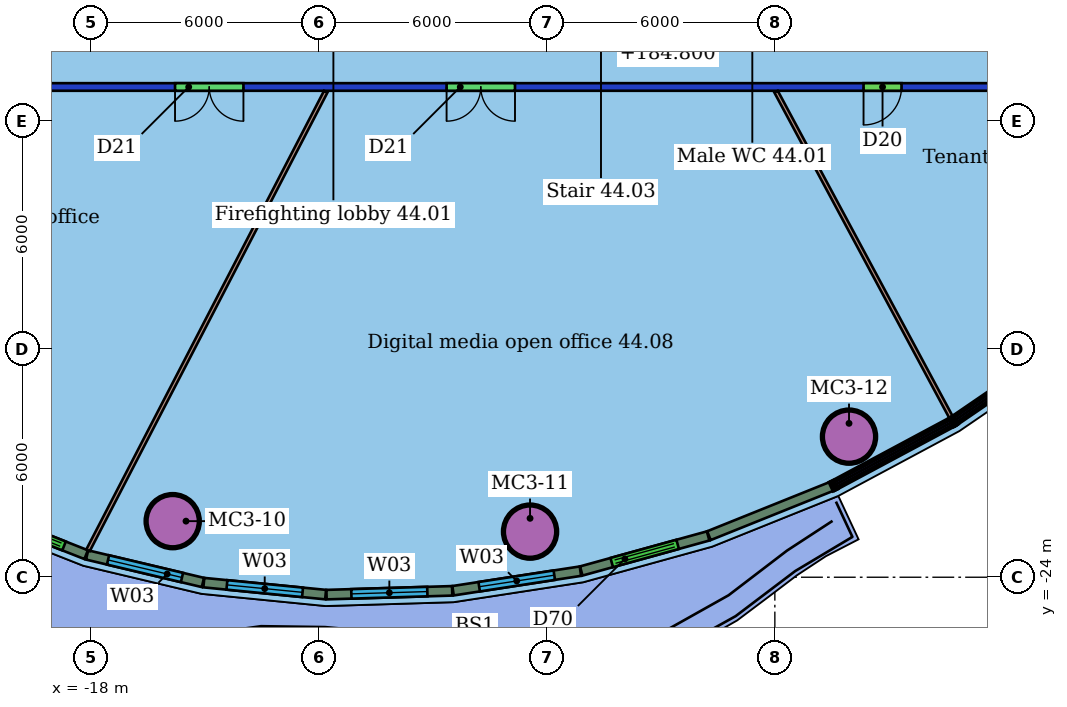
"""IFC4 building model, lengths in metres.
Left out: names, types, materials, properties, quantities, classifications, styles, units other than length and angle.
Written with IfcOpenShell. Run it as: python <this file> out.ifc"""

import sys

from ifc_helpers import new_model, si_unit, direction, frame, frame_2d, origin, origin_2d, place, context, subcontext, project, spatial, rectangle, hollow_circle, extrude, element, fill, save


model = new_model("IFC4")
c1 = context("Model", 3, precision=1e-05, world=origin(), true_north=direction((0.0, 1.0)))
c2 = subcontext(c1, "Body", "Model", "MODEL_VIEW")
j1 = project(units=[si_unit("LENGTHUNIT", "METRE"), si_unit("PLANEANGLEUNIT", "RADIAN")], contexts=[c1])
p1 = place(None, origin())
s1 = spatial("IfcSite", under=j1, at=p1, CompositionType="ELEMENT")
p2 = place(p1, origin())
s2 = spatial("IfcBuilding", under=s1, at=p2, CompositionType="ELEMENT")
p3 = place(p2, frame((0.0, 0.0, 183.0)))
s3 = spatial("IfcBuildingStorey", under=s2, at=p3, CompositionType="ELEMENT", Elevation=183.0)
for number, where, z_axis, x_axis in (
    (1, (-15.845, -22.524, 0.0), (0.0, 0.0, 1.0), (1.0, 0.0, 0.0)),
    (2, (-6.442, -22.8, 0.0), (0.0, 0.0, 1.0), (1.0, 0.0, 0.0)),
    (3, (1.952, -20.301, 0.0), (0.0, 0.0, 1.0), (1.0, 0.0, 0.0)),
):
    element("IfcColumn", number, at=place(p3, frame(where, z_axis=z_axis, x_axis=x_axis)), inside=s3, PredefinedType="COLUMN", context=c2, shape_type="SweptSolid", body=[
        extrude(hollow_circle(Radius=0.7, WallThickness=0.05, at=origin_2d()), origin(), (0.0, 0.0, 1.0), 3.45),
    ])
p4 = place(p3, frame((8.2, -11.1, 0.0), z_axis=(0.0, 0.0, 1.0), x_axis=(-1.0, 0.0, 0.0)))
e4 = element("IfcWall", 4, at=p4, inside=s3, PredefinedType="PARTITIONING", context=c2, shape_type="SweptSolid", body=[
    extrude(rectangle(XDim=28.4, YDim=0.2, at=frame_2d((14.2, 0.0))), origin(), (0.0, 0.0, 1.0), 3.05),
])
p5 = place(p4, frame((22.184, 0.0, 0.0)))
e5 = element("IfcOpeningElement", 5, at=p5, cuts=e4, PredefinedType="OPENING", context=c2, shape_type="SweptSolid", body=[
    extrude(rectangle(XDim=1.8, YDim=2.1, at=frame_2d((0.9, 1.05))), frame((0.0, 0.11, 0.0), z_axis=(0.0, -1.0, 0.0), x_axis=(1.0, 0.0, 0.0)), (0.0, 0.0, 1.0), 0.22),
])
p6 = place(p4, frame((15.038, 0.0, 0.0)))
e6 = element("IfcOpeningElement", 6, at=p6, cuts=e4, PredefinedType="OPENING", context=c2, shape_type="SweptSolid", body=[
    extrude(rectangle(XDim=1.8, YDim=2.1, at=frame_2d((0.9, 1.05))), frame((0.0, 0.11, 0.0), z_axis=(0.0, -1.0, 0.0), x_axis=(1.0, 0.0, 0.0)), (0.0, 0.0, 1.0), 0.22),
])
p7 = place(p4, frame((4.866, 0.0, 0.0)))
e7 = element("IfcOpeningElement", 7, at=p7, cuts=e4, PredefinedType="OPENING", context=c2, shape_type="SweptSolid", body=[
    extrude(rectangle(XDim=1.0, YDim=2.1, at=frame_2d((0.5, 1.05))), frame((0.0, 0.11, 0.0), z_axis=(0.0, -1.0, 0.0), x_axis=(1.0, 0.0, 0.0)), (0.0, 0.0, 1.0), 0.22),
])
p8 = place(p3, frame((-18.073, -23.292, 0.0), z_axis=(0.0, 0.0, 1.0), x_axis=(0.460190817997, 0.88782003302, 0.0)))
e8 = element("IfcWall", 8, at=p8, inside=s3, PredefinedType="PARTITIONING", context=c2, shape_type="SweptSolid", body=[
    extrude(rectangle(XDim=13.594, YDim=0.1, at=frame_2d((6.797, 0.0))), origin(), (0.0, 0.0, 1.0), 3.45),
])
p9 = place(p3, frame((4.636, -19.79, 0.0), z_axis=(0.0, 0.0, 1.0), x_axis=(-0.473408054694, 0.880843240169, 0.0)))
e9 = element("IfcWall", 9, at=p9, inside=s3, PredefinedType="PARTITIONING", context=c2, shape_type="SweptSolid", body=[
    extrude(rectangle(XDim=9.725, YDim=0.1, at=frame_2d((4.863, 0.0))), origin(), (0.0, 0.0, 1.0), 3.45),
])
p10 = place(p3, frame((-20.961, -22.287, 0.0), z_axis=(0.0, 0.0, 1.0), x_axis=(0.930291773294, -0.366820414564, 0.0)))
e10 = element("IfcWall", 10, at=p10, inside=s3, PredefinedType="SOLIDWALL", context=c2, shape_type="SweptSolid", body=[
    extrude(rectangle(XDim=3.052, YDim=0.25, at=frame_2d((1.526, 0.0))), origin(), (0.0, 0.0, 1.0), 3.1),
])
p11 = place(p10, frame((0.626, 0.0, 0.0)))
e11 = element("IfcOpeningElement", 11, at=p11, cuts=e10, PredefinedType="OPENING", context=c2, shape_type="SweptSolid", body=[
    extrude(rectangle(XDim=1.8, YDim=2.4, at=frame_2d((0.9, 1.2))), frame((0.0, 0.135, 0.0), z_axis=(0.0, -1.0, 0.0), x_axis=(1.0, 0.0, 0.0)), (0.0, 0.0, 1.0), 0.27),
])
p12 = place(p3, frame((-18.098, -23.414, 0.0), z_axis=(0.0, 0.0, 1.0), x_axis=(0.972913986276, -0.231167418353, 0.0)))
e12 = element("IfcWall", 12, at=p12, inside=s3, PredefinedType="SOLIDWALL", context=c2, shape_type="SweptSolid", body=[
    extrude(rectangle(XDim=3.133, YDim=0.25, at=frame_2d((1.566, 0.0))), origin(), (0.0, 0.0, 1.0), 3.1),
])
p13 = place(p12, frame((0.566, 0.0, 0.9)))
e13 = element("IfcOpeningElement", 13, at=p13, cuts=e12, PredefinedType="OPENING", context=c2, shape_type="SweptSolid", body=[
    extrude(rectangle(XDim=2.0, YDim=2.1, at=frame_2d((1.0, 1.05))), frame((0.0, 0.135, 0.0), z_axis=(0.0, -1.0, 0.0), x_axis=(1.0, 0.0, 0.0)), (0.0, 0.0, 1.0), 0.27),
])
p14 = place(p3, frame((-15.026, -24.142, 0.0), z_axis=(0.0, 0.0, 1.0), x_axis=(0.995197289781, -0.097889501037, 0.0)))
e14 = element("IfcWall", 14, at=p14, inside=s3, PredefinedType="SOLIDWALL", context=c2, shape_type="SweptSolid", body=[
    extrude(rectangle(XDim=3.22, YDim=0.25, at=frame_2d((1.61, 0.0))), origin(), (0.0, 0.0, 1.0), 3.1),
])
p15 = place(p14, frame((0.61, 0.0, 0.9)))
e15 = element("IfcOpeningElement", 15, at=p15, cuts=e14, PredefinedType="OPENING", context=c2, shape_type="SweptSolid", body=[
    extrude(rectangle(XDim=2.0, YDim=2.1, at=frame_2d((1.0, 1.05))), frame((0.0, 0.135, 0.0), z_axis=(0.0, -1.0, 0.0), x_axis=(1.0, 0.0, 0.0)), (0.0, 0.0, 1.0), 0.27),
])
p16 = place(p3, frame((-11.797, -24.458, 0.0), z_axis=(0.0, 0.0, 1.0), x_axis=(0.999539823928, 0.030333815819, 0.0)))
e16 = element("IfcWall", 16, at=p16, inside=s3, PredefinedType="SOLIDWALL", context=c2, shape_type="SweptSolid", body=[
    extrude(rectangle(XDim=3.308, YDim=0.25, at=frame_2d((1.654, 0.0))), origin(), (0.0, 0.0, 1.0), 3.1),
])
p17 = place(p16, frame((0.654, 0.0, 0.9)))
e17 = element("IfcOpeningElement", 17, at=p17, cuts=e16, PredefinedType="OPENING", context=c2, shape_type="SweptSolid", body=[
    extrude(rectangle(XDim=2.0, YDim=2.1, at=frame_2d((1.0, 1.05))), frame((0.0, 0.135, 0.0), z_axis=(0.0, -1.0, 0.0), x_axis=(1.0, 0.0, 0.0)), (0.0, 0.0, 1.0), 0.27),
])
p18 = place(p3, frame((-8.468, -24.355, 0.0), z_axis=(0.0, 0.0, 1.0), x_axis=(0.988391666962, 0.151927326968, 0.0)))
e18 = element("IfcWall", 18, at=p18, inside=s3, PredefinedType="SOLIDWALL", context=c2, shape_type="SweptSolid", body=[
    extrude(rectangle(XDim=3.391, YDim=0.25, at=frame_2d((1.695, 0.0))), origin(), (0.0, 0.0, 1.0), 3.1),
])
p19 = place(p18, frame((0.695, 0.0, 0.9)))
e19 = element("IfcOpeningElement", 19, at=p19, cuts=e18, PredefinedType="OPENING", context=c2, shape_type="SweptSolid", body=[
    extrude(rectangle(XDim=2.0, YDim=2.1, at=frame_2d((1.0, 1.05))), frame((0.0, 0.135, 0.0), z_axis=(0.0, -1.0, 0.0), x_axis=(1.0, 0.0, 0.0)), (0.0, 0.0, 1.0), 0.27),
])
p20 = place(p3, frame((-5.094, -23.836, 0.0), z_axis=(0.0, 0.0, 1.0), x_axis=(0.963922792933, 0.266181985236, 0.0)))
e20 = element("IfcWall", 20, at=p20, inside=s3, PredefinedType="SOLIDWALL", context=c2, shape_type="SweptSolid", body=[
    extrude(rectangle(XDim=3.463, YDim=0.25, at=frame_2d((1.732, 0.0))), origin(), (0.0, 0.0, 1.0), 3.1),
])
p21 = place(p20, frame((0.832, 0.0, 0.0)))
e21 = element("IfcOpeningElement", 21, at=p21, cuts=e20, PredefinedType="OPENING", context=c2, shape_type="SweptSolid", body=[
    extrude(rectangle(XDim=1.8, YDim=2.4, at=frame_2d((0.9, 1.2))), frame((0.0, 0.135, 0.0), z_axis=(0.0, -1.0, 0.0), x_axis=(1.0, 0.0, 0.0)), (0.0, 0.0, 1.0), 0.27),
])
p22 = place(p3, frame((-1.735, -22.907, 0.0), z_axis=(0.0, 0.0, 1.0), x_axis=(0.92785563981, 0.372939554984, 0.0)))
e22 = element("IfcWall", 22, at=p22, inside=s3, PredefinedType="SOLIDWALL", context=c2, shape_type="SweptSolid", body=[
    extrude(rectangle(XDim=3.478, YDim=0.25, at=frame_2d((1.739, 0.0))), origin(), (0.0, 0.0, 1.0), 3.1),
])
p23 = place(p5, origin())
e23 = element("IfcDoor", 23, at=p23, inside=s3, OperationType="DOUBLE_DOOR_SINGLE_SWING", PredefinedType="DOOR", context=c2, shape_type="SweptSolid", body=[
    extrude(rectangle(XDim=1.8, YDim=2.1, at=frame_2d((0.9, 1.05))), frame((0.0, 0.025, 0.0), z_axis=(0.0, -1.0, 0.0), x_axis=(1.0, 0.0, 0.0)), (0.0, 0.0, 1.0), 0.05),
])
fill(e5, e23)
p24 = place(p6, origin())
e24 = element("IfcDoor", 24, at=p24, inside=s3, OperationType="DOUBLE_DOOR_SINGLE_SWING", PredefinedType="DOOR", context=c2, shape_type="SweptSolid", body=[
    extrude(rectangle(XDim=1.8, YDim=2.1, at=frame_2d((0.9, 1.05))), frame((0.0, 0.025, 0.0), z_axis=(0.0, -1.0, 0.0), x_axis=(1.0, 0.0, 0.0)), (0.0, 0.0, 1.0), 0.05),
])
fill(e6, e24)
p25 = place(p7, origin())
e25 = element("IfcDoor", 25, at=p25, inside=s3, OperationType="SINGLE_SWING_RIGHT", PredefinedType="DOOR", context=c2, shape_type="SweptSolid", body=[
    extrude(rectangle(XDim=1.0, YDim=2.1, at=frame_2d((0.5, 1.05))), frame((0.0, 0.025, 0.0), z_axis=(0.0, -1.0, 0.0), x_axis=(1.0, 0.0, 0.0)), (0.0, 0.0, 1.0), 0.05),
])
fill(e7, e25)
p26 = place(p11, origin())
e26 = element("IfcDoor", 26, at=p26, inside=s3, OperationType="DOUBLE_DOOR_SLIDING", PredefinedType="DOOR", context=c2, shape_type="SweptSolid", body=[
    extrude(rectangle(XDim=1.8, YDim=2.4, at=frame_2d((0.9, 1.2))), frame((0.0, 0.025, 0.0), z_axis=(0.0, -1.0, 0.0), x_axis=(1.0, 0.0, 0.0)), (0.0, 0.0, 1.0), 0.05),
])
fill(e11, e26)
p27 = place(p13, origin())
e27 = element("IfcWindow", 27, at=p27, inside=s3, PartitioningType="SINGLE_PANEL", PredefinedType="WINDOW", context=c2, shape_type="SweptSolid", body=[
    extrude(rectangle(XDim=2.0, YDim=2.1, at=frame_2d((1.0, 1.05))), frame((0.0, 0.03, 0.0), z_axis=(0.0, -1.0, 0.0), x_axis=(1.0, 0.0, 0.0)), (0.0, 0.0, 1.0), 0.06),
])
fill(e13, e27)
p28 = place(p15, origin())
e28 = element("IfcWindow", 28, at=p28, inside=s3, PartitioningType="SINGLE_PANEL", PredefinedType="WINDOW", context=c2, shape_type="SweptSolid", body=[
    extrude(rectangle(XDim=2.0, YDim=2.1, at=frame_2d((1.0, 1.05))), frame((0.0, 0.03, 0.0), z_axis=(0.0, -1.0, 0.0), x_axis=(1.0, 0.0, 0.0)), (0.0, 0.0, 1.0), 0.06),
])
fill(e15, e28)
p29 = place(p17, origin())
e29 = element("IfcWindow", 29, at=p29, inside=s3, PartitioningType="SINGLE_PANEL", PredefinedType="WINDOW", context=c2, shape_type="SweptSolid", body=[
    extrude(rectangle(XDim=2.0, YDim=2.1, at=frame_2d((1.0, 1.05))), frame((0.0, 0.03, 0.0), z_axis=(0.0, -1.0, 0.0), x_axis=(1.0, 0.0, 0.0)), (0.0, 0.0, 1.0), 0.06),
])
fill(e17, e29)
p30 = place(p19, origin())
e30 = element("IfcWindow", 30, at=p30, inside=s3, PartitioningType="SINGLE_PANEL", PredefinedType="WINDOW", context=c2, shape_type="SweptSolid", body=[
    extrude(rectangle(XDim=2.0, YDim=2.1, at=frame_2d((1.0, 1.05))), frame((0.0, 0.03, 0.0), z_axis=(0.0, -1.0, 0.0), x_axis=(1.0, 0.0, 0.0)), (0.0, 0.0, 1.0), 0.06),
])
fill(e19, e30)
p31 = place(p21, origin())
e31 = element("IfcDoor", 31, at=p31, inside=s3, OperationType="DOUBLE_DOOR_SLIDING", PredefinedType="DOOR", context=c2, shape_type="SweptSolid", body=[
    extrude(rectangle(XDim=1.8, YDim=2.4, at=frame_2d((0.9, 1.2))), frame((0.0, 0.025, 0.0), z_axis=(0.0, -1.0, 0.0), x_axis=(1.0, 0.0, 0.0)), (0.0, 0.0, 1.0), 0.05),
])
fill(e21, e31)
save(model, sys.argv[1])
